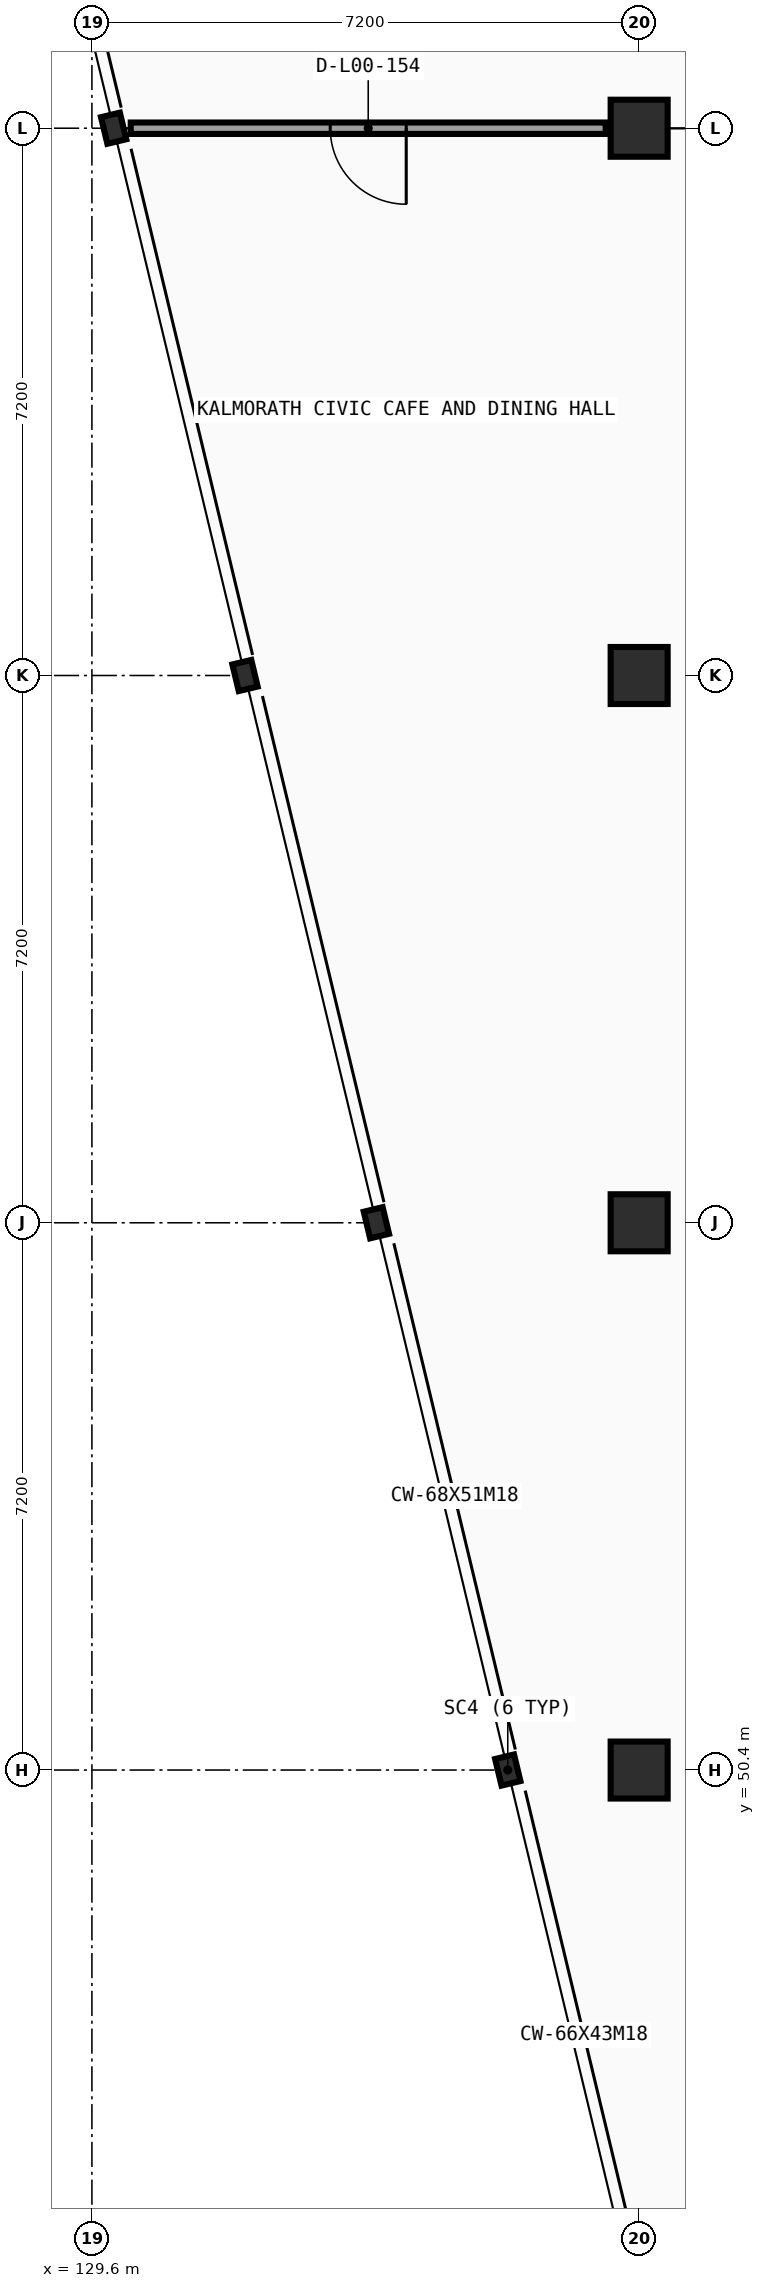
"""IFC4 building model, lengths in metres.
Left out: names, types, materials, properties, quantities, classifications, styles, units other than length and angle.
Written with IfcOpenShell. Run it as: python <this file> out.ifc"""

import sys

from ifc_helpers import new_model, si_unit, direction, frame, frame_2d, origin, origin_2d, place, context, subcontext, project, spatial, rectangle, i_section, extrude, element, fill, save


model = new_model("IFC4")
c1 = context("Model", 3, precision=1e-05, world=origin(), true_north=direction((0.0, 1.0)))
c2 = subcontext(c1, "Body", "Model", "MODEL_VIEW")
j1 = project(units=[si_unit("LENGTHUNIT", "METRE"), si_unit("PLANEANGLEUNIT", "RADIAN")], contexts=[c1])
p1 = place(None, origin())
s1 = spatial("IfcSite", under=j1, at=p1, CompositionType="ELEMENT")
p2 = place(p1, origin())
s2 = spatial("IfcBuilding", under=s1, at=p2, CompositionType="ELEMENT")
p3 = place(p2, origin())
s3 = spatial("IfcBuildingStorey", under=s2, at=p3, CompositionType="ELEMENT", Elevation=0.0)
for number, where, z_axis, x_axis in (
    (1, (136.8, 50.4, 0.0), (0.0, 0.0, 1.0), (1.0, 0.0, 0.0)),
    (2, (136.8, 57.6, 0.0), (0.0, 0.0, 1.0), (1.0, 0.0, 0.0)),
    (3, (136.8, 64.8, 0.0), (0.0, 0.0, 1.0), (1.0, 0.0, 0.0)),
    (4, (136.8, 72.0, 0.0), (0.0, 0.0, 1.0), (1.0, 0.0, 0.0)),
):
    element("IfcColumn", number, at=place(p3, frame(where, z_axis=z_axis, x_axis=x_axis)), inside=s3, PredefinedType="COLUMN", context=c2, shape_type="SweptSolid", body=[
        extrude(rectangle(XDim=0.75, YDim=0.75, at=origin_2d()), origin(), (0.0, 0.0, 1.0), 5.4),
    ])
for number, where, z_axis, x_axis in (
    (5, (135.071, 50.4, 0.0), (0.0, 0.0, 1.0), (0.972, 0.233, 0.0)),
    (6, (133.343, 57.6, 0.0), (0.0, 0.0, 1.0), (0.972, 0.233, 0.0)),
    (7, (131.614, 64.8, 0.0), (0.0, 0.0, 1.0), (0.972, 0.233, 0.0)),
    (8, (129.886, 72.0, 0.0), (0.0, 0.0, 1.0), (0.972, 0.233, 0.0)),
):
    element("IfcColumn", number, at=place(p3, frame(where, z_axis=z_axis, x_axis=x_axis)), inside=s3, PredefinedType="COLUMN", context=c2, shape_type="SweptSolid", body=[
        extrude(i_section(OverallWidth=0.256, OverallDepth=0.36, WebThickness=0.011, FlangeThickness=0.02, FilletRadius=0.015, at=origin_2d()), origin(), (0.0, 0.0, 1.0), 5.4),
    ])
p4 = place(p3, frame((130.111, 72.0, 0.0), z_axis=(0.0, 0.0, 1.0), x_axis=(1.0, 0.0, 0.0)))
e9 = element("IfcWall", 9, at=p4, inside=s3, PredefinedType="PARTITIONING", context=c2, shape_type="SweptSolid", body=[
    extrude(rectangle(XDim=6.25, YDim=0.15, at=frame_2d((3.125, 0.0))), origin(), (0.0, 0.0, 1.0), 5.12),
])
p5 = place(p4, frame((2.625, 0.0, 0.0)))
e10 = element("IfcOpeningElement", 10, at=p5, cuts=e9, PredefinedType="OPENING", context=c2, shape_type="SweptSolid", body=[
    extrude(rectangle(XDim=1.0, YDim=2.1, at=frame_2d((0.5, 1.05))), frame((0.0, 0.085, 0.0), z_axis=(0.0, -1.0, 0.0), x_axis=(1.0, 0.0, 0.0)), (0.0, 0.0, 1.0), 0.17),
])
p6 = place(p5, origin())
e11 = element("IfcDoor", 11, at=p6, inside=s3, OperationType="SINGLE_SWING_RIGHT", PredefinedType="DOOR", context=c2, shape_type="SweptSolid", body=[
    extrude(rectangle(XDim=1.0, YDim=2.1, at=frame_2d((0.5, 1.05))), frame((0.0, 0.025, 0.0), z_axis=(0.0, -1.0, 0.0), x_axis=(1.0, 0.0, 0.0)), (0.0, 0.0, 1.0), 0.05),
])
fill(e10, e11)
save(model, sys.argv[1])
